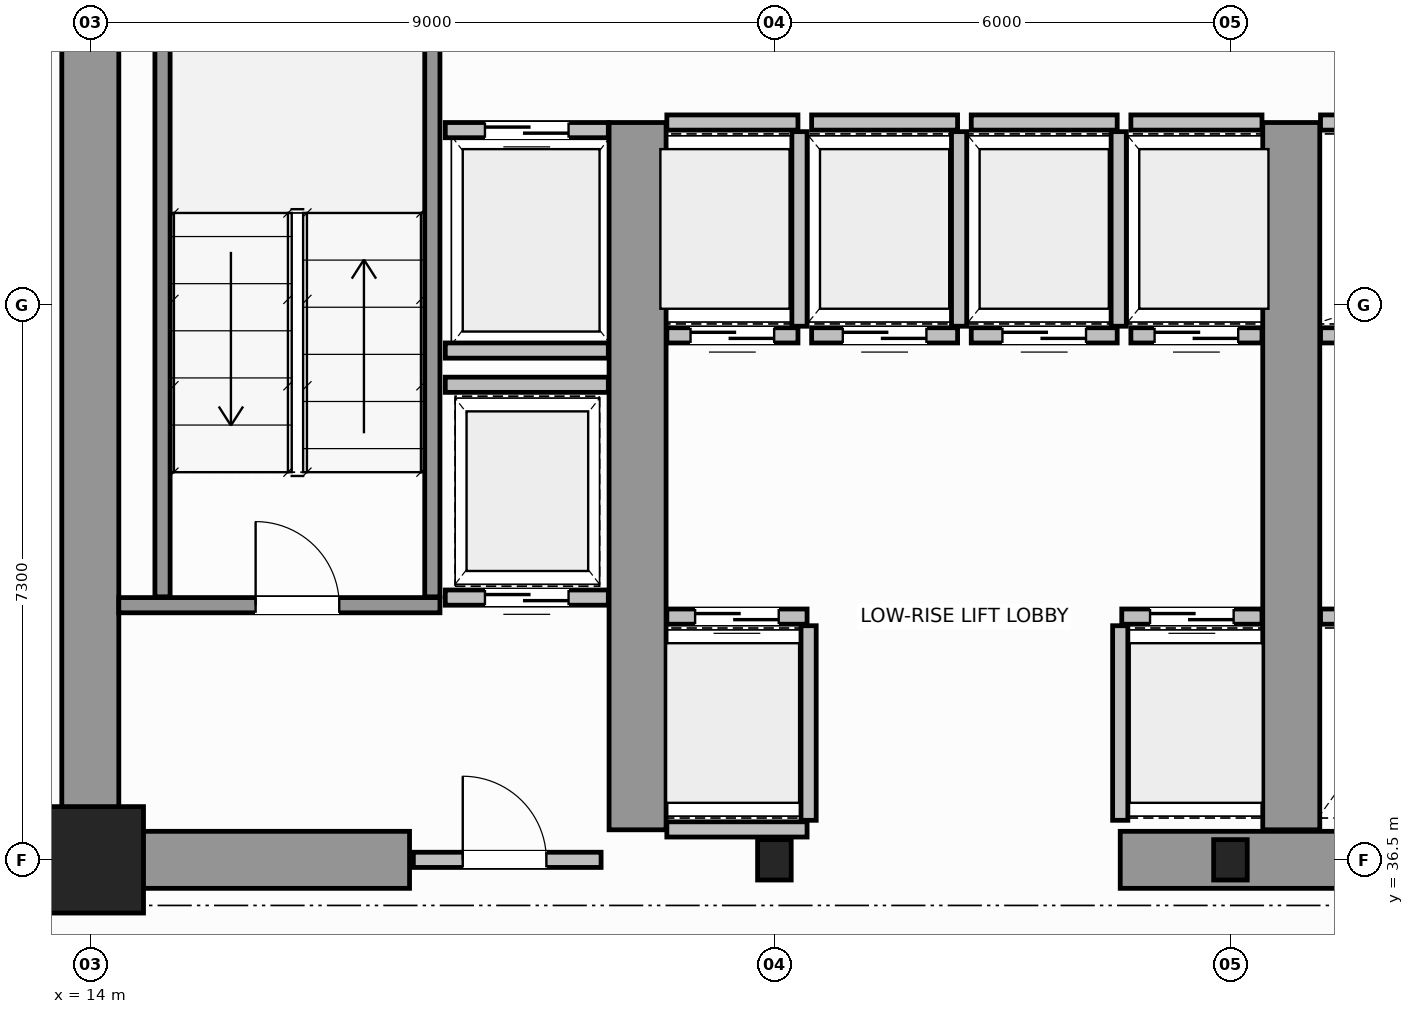
"""IFC4 building model, lengths in metres.
Left out: names, types, materials, properties, quantities, classifications, styles, units other than length and angle.
Written with IfcOpenShell. Run it as: python <this file> out.ifc"""

import sys

from ifc_helpers import new_model, si_unit, direction, frame, frame_2d, origin, origin_2d, place, context, subcontext, project, spatial, rectangle, i_section, extrude, source, transform, mapped, element, fill, save


model = new_model("IFC4")
c1 = context("Model", 3, precision=1e-05, world=origin(), true_north=direction((0.0, 1.0)))
c2 = subcontext(c1, "Body", "Model", "MODEL_VIEW")
j1 = project(units=[si_unit("LENGTHUNIT", "METRE"), si_unit("PLANEANGLEUNIT", "RADIAN")], contexts=[c1])
p1 = place(None, origin())
s1 = spatial("IfcSite", under=j1, at=p1, CompositionType="ELEMENT")
p2 = place(p1, origin())
s2 = spatial("IfcBuilding", under=s1, at=p2, CompositionType="ELEMENT")
p3 = place(p2, frame((0.0, 0.0, 95.8)))
s3 = spatial("IfcBuildingStorey", under=s2, at=p3, CompositionType="ELEMENT", Elevation=95.8)
m1 = source(origin(), c2, "Body", "SweptSolid", [
    extrude(rectangle(XDim=1.4, YDim=1.4, at=origin_2d()), origin(), (0.0, 0.0, 1.0), 3.8),
])
p4 = place(p3, frame((14.0, 36.5, 0.0), z_axis=(0.0, 0.0, 1.0), x_axis=(1.0, 0.0, 0.0)))
e1 = element("IfcColumn", 1, at=p4, inside=s3, PredefinedType="COLUMN", context=c2, shape_type="MappedRepresentation", body=[
    mapped(m1, transform((0.0, 0.0, 0.0), scale=1.0)),
])
m2 = source(origin(), c2, "Body", "SweptSolid", [
    extrude(i_section(OverallWidth=0.442, OverallDepth=0.531, WebThickness=0.065, FlangeThickness=0.076, FilletRadius=0.015, at=origin_2d()), origin(), (0.0, 0.0, 1.0), 3.8),
])
for number, where, z_axis, x_axis in (
    (2, (23.0, 36.5, 0.0), (0.0, 0.0, 1.0), (1.0, 0.0, 0.0)),
    (3, (29.0, 36.5, 0.0), (0.0, 0.0, 1.0), (1.0, 0.0, 0.0)),
):
    element("IfcColumn", number, at=place(p3, frame(where, z_axis=z_axis, x_axis=x_axis)), inside=s3, PredefinedType="COLUMN", context=c2, shape_type="MappedRepresentation", body=[
        mapped(m2, transform((0.0, 0.0, 0.0), scale=1.0)),
    ])
p5 = place(p3, frame((14.0, 36.5, 0.0), z_axis=(0.0, 0.0, 1.0), x_axis=(0.0, 1.0, 0.0)))
e4 = element("IfcWall", 4, at=p5, inside=s3, PredefinedType="SHEAR", context=c2, shape_type="SweptSolid", body=[
    extrude(rectangle(XDim=14.5, YDim=0.75, at=frame_2d((7.25, 0.0))), origin(), (0.0, 0.0, 1.0), 3.8),
])
p6 = place(p3, frame((14.395, 36.5, 0.0), z_axis=(0.0, 0.0, 1.0), x_axis=(1.0, 0.0, 0.0)))
e5 = element("IfcWall", 5, at=p6, inside=s3, PredefinedType="SHEAR", context=c2, shape_type="SweptSolid", body=[
    extrude(rectangle(XDim=3.805, YDim=0.75, at=frame_2d((1.902, 0.0))), origin(), (0.0, 0.0, 1.0), 2.38),
])
p7 = place(p3, frame((27.55, 36.5, 0.0), z_axis=(0.0, 0.0, 1.0), x_axis=(1.0, 0.0, 0.0)))
e6 = element("IfcWall", 6, at=p7, inside=s3, PredefinedType="SHEAR", context=c2, shape_type="SweptSolid", body=[
    extrude(rectangle(XDim=4.5, YDim=0.75, at=frame_2d((2.25, 0.0))), origin(), (0.0, 0.0, 1.0), 3.8),
])
for number, where, z_axis, x_axis in (
    (7, (21.2, 36.895, 0.0), (0.0, 0.0, 1.0), (0.0, 1.0, 0.0)),
    (8, (29.8, 36.895, 0.0), (0.0, 0.0, 1.0), (0.0, 1.0, 0.0)),
):
    element("IfcWall", number, at=place(p3, frame(where, z_axis=z_axis, x_axis=x_axis)), inside=s3, PredefinedType="SHEAR", context=c2, shape_type="SweptSolid", body=[
        extrude(rectangle(XDim=9.305, YDim=0.75, at=frame_2d((4.652, 0.0))), origin(), (0.0, 0.0, 1.0), 3.8),
    ])
p8 = place(p3, frame((14.375, 39.85, 0.0), z_axis=(0.0, 0.0, 1.0), x_axis=(1.0, 0.0, 0.0)))
e9 = element("IfcWall", 9, at=p8, inside=s3, PredefinedType="SOLIDWALL", context=c2, shape_type="SweptSolid", body=[
    extrude(rectangle(XDim=4.225, YDim=0.2, at=frame_2d((2.113, 0.0))), origin(), (0.0, 0.0, 1.0), 3.8),
])
p9 = place(p8, frame((1.8, 0.0, 0.0)))
e10 = element("IfcOpeningElement", 10, at=p9, cuts=e9, PredefinedType="OPENING", context=c2, shape_type="SweptSolid", body=[
    extrude(rectangle(XDim=1.1, YDim=2.15, at=frame_2d((0.55, 1.075))), frame((0.0, 0.11, 0.0), z_axis=(0.0, -1.0, 0.0), x_axis=(1.0, 0.0, 0.0)), (0.0, 0.0, 1.0), 0.22),
])
for number, where, z_axis, x_axis in (
    (11, (14.95, 39.96, 0.0), (0.0, 0.0, 1.0), (0.0, 1.0, 0.0)),
    (12, (18.5, 39.96, 0.0), (0.0, 0.0, 1.0), (0.0, 1.0, 0.0)),
):
    element("IfcWall", number, at=place(p3, frame(where, z_axis=z_axis, x_axis=x_axis)), inside=s3, PredefinedType="SOLIDWALL", context=c2, shape_type="SweptSolid", body=[
        extrude(rectangle(XDim=9.93, YDim=0.2, at=frame_2d((4.965, 0.0))), origin(), (0.0, 0.0, 1.0), 3.8),
    ])
p10 = place(p3, frame((18.25, 36.5, 0.0), z_axis=(0.0, 0.0, 1.0), x_axis=(1.0, 0.0, 0.0)))
e13 = element("IfcWall", 13, at=p10, inside=s3, PredefinedType="SOLIDWALL", context=c2, shape_type="SweptSolid", body=[
    extrude(rectangle(XDim=2.47, YDim=0.2, at=frame_2d((1.235, 0.0))), origin(), (0.0, 0.0, 1.0), 2.37),
])
p11 = place(p10, frame((0.65, 0.0, 0.0)))
e14 = element("IfcOpeningElement", 14, at=p11, cuts=e13, PredefinedType="OPENING", context=c2, shape_type="SweptSolid", body=[
    extrude(rectangle(XDim=1.1, YDim=2.15, at=frame_2d((0.55, 1.075))), frame((0.0, 0.11, 0.0), z_axis=(0.0, -1.0, 0.0), x_axis=(1.0, 0.0, 0.0)), (0.0, 0.0, 1.0), 0.22),
])
p12 = place(p3, frame((21.585, 39.7, 0.0), z_axis=(0.0, 0.0, 1.0), x_axis=(1.0, 0.0, 0.0)))
e15 = element("IfcWall", 15, at=p12, inside=s3, PredefinedType="SOLIDWALL", context=c2, shape_type="SweptSolid", body=[
    extrude(rectangle(XDim=1.845, YDim=0.2, at=frame_2d((0.922, 0.0))), origin(), (0.0, 0.0, 1.0), 3.58),
])
p13 = place(p12, frame((0.372, 0.0, 0.0)))
e16 = element("IfcOpeningElement", 16, at=p13, cuts=e15, PredefinedType="OPENING", context=c2, shape_type="SweptSolid", body=[
    extrude(rectangle(XDim=1.1, YDim=2.15, at=frame_2d((0.55, 1.075))), frame((0.0, 0.11, 0.0), z_axis=(0.0, -1.0, 0.0), x_axis=(1.0, 0.0, 0.0)), (0.0, 0.0, 1.0), 0.22),
])
p14 = place(p3, frame((21.585, 36.9, 0.0), z_axis=(0.0, 0.0, 1.0), x_axis=(1.0, 0.0, 0.0)))
e17 = element("IfcWall", 17, at=p14, inside=s3, PredefinedType="SOLIDWALL", context=c2, shape_type="SweptSolid", body=[
    extrude(rectangle(XDim=1.845, YDim=0.2, at=frame_2d((0.922, 0.0))), origin(), (0.0, 0.0, 1.0), 2.37),
])
p15 = place(p3, frame((23.45, 37.02, 0.0), z_axis=(0.0, 0.0, 1.0), x_axis=(0.0, 1.0, 0.0)))
e18 = element("IfcWall", 18, at=p15, inside=s3, PredefinedType="SOLIDWALL", context=c2, shape_type="SweptSolid", body=[
    extrude(rectangle(XDim=2.56, YDim=0.2, at=frame_2d((1.28, 0.0))), origin(), (0.0, 0.0, 1.0), 3.58),
])
p16 = place(p3, frame((27.57, 39.7, 0.0), z_axis=(0.0, 0.0, 1.0), x_axis=(1.0, 0.0, 0.0)))
e19 = element("IfcWall", 19, at=p16, inside=s3, PredefinedType="SOLIDWALL", context=c2, shape_type="SweptSolid", body=[
    extrude(rectangle(XDim=1.845, YDim=0.2, at=frame_2d((0.922, 0.0))), origin(), (0.0, 0.0, 1.0), 3.58),
])
p17 = place(p16, frame((0.372, 0.0, 0.0)))
e20 = element("IfcOpeningElement", 20, at=p17, cuts=e19, PredefinedType="OPENING", context=c2, shape_type="SweptSolid", body=[
    extrude(rectangle(XDim=1.1, YDim=2.15, at=frame_2d((0.55, 1.075))), frame((0.0, 0.11, 0.0), z_axis=(0.0, -1.0, 0.0), x_axis=(1.0, 0.0, 0.0)), (0.0, 0.0, 1.0), 0.22),
])
p18 = place(p3, frame((27.55, 37.02, 0.0), z_axis=(0.0, 0.0, 1.0), x_axis=(0.0, 1.0, 0.0)))
e21 = element("IfcWall", 21, at=p18, inside=s3, PredefinedType="SOLIDWALL", context=c2, shape_type="SweptSolid", body=[
    extrude(rectangle(XDim=2.56, YDim=0.2, at=frame_2d((1.28, 0.0))), origin(), (0.0, 0.0, 1.0), 3.58),
])
p19 = place(p3, frame((21.585, 43.4, 0.0), z_axis=(0.0, 0.0, 1.0), x_axis=(1.0, 0.0, 0.0)))
e22 = element("IfcWall", 22, at=p19, inside=s3, PredefinedType="SOLIDWALL", context=c2, shape_type="SweptSolid", body=[
    extrude(rectangle(XDim=1.725, YDim=0.2, at=frame_2d((0.863, 0.0))), origin(), (0.0, 0.0, 1.0), 3.58),
])
p20 = place(p19, frame((0.312, 0.0, 0.0)))
e23 = element("IfcOpeningElement", 23, at=p20, cuts=e22, PredefinedType="OPENING", context=c2, shape_type="SweptSolid", body=[
    extrude(rectangle(XDim=1.1, YDim=2.15, at=frame_2d((0.55, 1.075))), frame((0.0, 0.11, 0.0), z_axis=(0.0, -1.0, 0.0), x_axis=(1.0, 0.0, 0.0)), (0.0, 0.0, 1.0), 0.22),
])
p21 = place(p3, frame((21.585, 46.2, 0.0), z_axis=(0.0, 0.0, 1.0), x_axis=(1.0, 0.0, 0.0)))
e24 = element("IfcWall", 24, at=p21, inside=s3, PredefinedType="SOLIDWALL", context=c2, shape_type="SweptSolid", body=[
    extrude(rectangle(XDim=1.725, YDim=0.2, at=frame_2d((0.863, 0.0))), origin(), (0.0, 0.0, 1.0), 3.58),
])
p22 = place(p3, frame((23.33, 43.52, 0.0), z_axis=(0.0, 0.0, 1.0), x_axis=(0.0, 1.0, 0.0)))
e25 = element("IfcWall", 25, at=p22, inside=s3, PredefinedType="SOLIDWALL", context=c2, shape_type="SweptSolid", body=[
    extrude(rectangle(XDim=2.56, YDim=0.2, at=frame_2d((1.28, 0.0))), origin(), (0.0, 0.0, 1.0), 3.58),
])
p23 = place(p3, frame((23.49, 43.4, 0.0), z_axis=(0.0, 0.0, 1.0), x_axis=(1.0, 0.0, 0.0)))
e26 = element("IfcWall", 26, at=p23, inside=s3, PredefinedType="SOLIDWALL", context=c2, shape_type="SweptSolid", body=[
    extrude(rectangle(XDim=1.92, YDim=0.2, at=frame_2d((0.96, 0.0))), origin(), (0.0, 0.0, 1.0), 3.58),
])
p24 = place(p23, frame((0.41, 0.0, 0.0)))
e27 = element("IfcOpeningElement", 27, at=p24, cuts=e26, PredefinedType="OPENING", context=c2, shape_type="SweptSolid", body=[
    extrude(rectangle(XDim=1.1, YDim=2.15, at=frame_2d((0.55, 1.075))), frame((0.0, 0.11, 0.0), z_axis=(0.0, -1.0, 0.0), x_axis=(1.0, 0.0, 0.0)), (0.0, 0.0, 1.0), 0.22),
])
p25 = place(p3, frame((23.49, 46.2, 0.0), z_axis=(0.0, 0.0, 1.0), x_axis=(1.0, 0.0, 0.0)))
e28 = element("IfcWall", 28, at=p25, inside=s3, PredefinedType="SOLIDWALL", context=c2, shape_type="SweptSolid", body=[
    extrude(rectangle(XDim=1.92, YDim=0.2, at=frame_2d((0.96, 0.0))), origin(), (0.0, 0.0, 1.0), 3.58),
])
p26 = place(p3, frame((25.43, 43.52, 0.0), z_axis=(0.0, 0.0, 1.0), x_axis=(0.0, 1.0, 0.0)))
e29 = element("IfcWall", 29, at=p26, inside=s3, PredefinedType="SOLIDWALL", context=c2, shape_type="SweptSolid", body=[
    extrude(rectangle(XDim=2.56, YDim=0.2, at=frame_2d((1.28, 0.0))), origin(), (0.0, 0.0, 1.0), 3.58),
])
p27 = place(p3, frame((25.59, 43.4, 0.0), z_axis=(0.0, 0.0, 1.0), x_axis=(1.0, 0.0, 0.0)))
e30 = element("IfcWall", 30, at=p27, inside=s3, PredefinedType="SOLIDWALL", context=c2, shape_type="SweptSolid", body=[
    extrude(rectangle(XDim=1.92, YDim=0.2, at=frame_2d((0.96, 0.0))), origin(), (0.0, 0.0, 1.0), 3.58),
])
p28 = place(p27, frame((0.41, 0.0, 0.0)))
e31 = element("IfcOpeningElement", 31, at=p28, cuts=e30, PredefinedType="OPENING", context=c2, shape_type="SweptSolid", body=[
    extrude(rectangle(XDim=1.1, YDim=2.15, at=frame_2d((0.55, 1.075))), frame((0.0, 0.11, 0.0), z_axis=(0.0, -1.0, 0.0), x_axis=(1.0, 0.0, 0.0)), (0.0, 0.0, 1.0), 0.22),
])
p29 = place(p3, frame((25.59, 46.2, 0.0), z_axis=(0.0, 0.0, 1.0), x_axis=(1.0, 0.0, 0.0)))
e32 = element("IfcWall", 32, at=p29, inside=s3, PredefinedType="SOLIDWALL", context=c2, shape_type="SweptSolid", body=[
    extrude(rectangle(XDim=1.92, YDim=0.2, at=frame_2d((0.96, 0.0))), origin(), (0.0, 0.0, 1.0), 3.58),
])
p30 = place(p3, frame((27.53, 43.52, 0.0), z_axis=(0.0, 0.0, 1.0), x_axis=(0.0, 1.0, 0.0)))
e33 = element("IfcWall", 33, at=p30, inside=s3, PredefinedType="SOLIDWALL", context=c2, shape_type="SweptSolid", body=[
    extrude(rectangle(XDim=2.56, YDim=0.2, at=frame_2d((1.28, 0.0))), origin(), (0.0, 0.0, 1.0), 3.58),
])
p31 = place(p3, frame((27.69, 43.4, 0.0), z_axis=(0.0, 0.0, 1.0), x_axis=(1.0, 0.0, 0.0)))
e34 = element("IfcWall", 34, at=p31, inside=s3, PredefinedType="SOLIDWALL", context=c2, shape_type="SweptSolid", body=[
    extrude(rectangle(XDim=1.725, YDim=0.2, at=frame_2d((0.863, 0.0))), origin(), (0.0, 0.0, 1.0), 3.58),
])
p32 = place(p31, frame((0.312, 0.0, 0.0)))
e35 = element("IfcOpeningElement", 35, at=p32, cuts=e34, PredefinedType="OPENING", context=c2, shape_type="SweptSolid", body=[
    extrude(rectangle(XDim=1.1, YDim=2.15, at=frame_2d((0.55, 1.075))), frame((0.0, 0.11, 0.0), z_axis=(0.0, -1.0, 0.0), x_axis=(1.0, 0.0, 0.0)), (0.0, 0.0, 1.0), 0.22),
])
p33 = place(p3, frame((27.69, 46.2, 0.0), z_axis=(0.0, 0.0, 1.0), x_axis=(1.0, 0.0, 0.0)))
e36 = element("IfcWall", 36, at=p33, inside=s3, PredefinedType="SOLIDWALL", context=c2, shape_type="SweptSolid", body=[
    extrude(rectangle(XDim=1.725, YDim=0.2, at=frame_2d((0.863, 0.0))), origin(), (0.0, 0.0, 1.0), 3.58),
])
p34 = place(p3, frame((30.185, 39.7, 0.0), z_axis=(0.0, 0.0, 1.0), x_axis=(1.0, 0.0, 0.0)))
e37 = element("IfcWall", 37, at=p34, inside=s3, PredefinedType="SOLIDWALL", context=c2, shape_type="SweptSolid", body=[
    extrude(rectangle(XDim=1.845, YDim=0.2, at=frame_2d((0.922, 0.0))), origin(), (0.0, 0.0, 1.0), 3.58),
])
for number, where, z_axis, x_axis in (
    (38, (30.185, 43.4, 0.0), (0.0, 0.0, 1.0), (1.0, 0.0, 0.0)),
    (39, (30.185, 46.2, 0.0), (0.0, 0.0, 1.0), (1.0, 0.0, 0.0)),
):
    element("IfcWall", number, at=place(p3, frame(where, z_axis=z_axis, x_axis=x_axis)), inside=s3, PredefinedType="SOLIDWALL", context=c2, shape_type="SweptSolid", body=[
        extrude(rectangle(XDim=1.725, YDim=0.2, at=frame_2d((0.862, 0.0))), origin(), (0.0, 0.0, 1.0), 3.58),
    ])
p35 = place(p3, frame((18.67, 46.1, 0.0), z_axis=(0.0, 0.0, 1.0), x_axis=(1.0, 0.0, 0.0)))
e40 = element("IfcWall", 40, at=p35, inside=s3, PredefinedType="SOLIDWALL", context=c2, shape_type="SweptSolid", body=[
    extrude(rectangle(XDim=2.145, YDim=0.2, at=frame_2d((1.073, 0.0))), origin(), (0.0, 0.0, 1.0), 3.58),
])
p36 = place(p35, frame((0.522, 0.0, 0.0)))
e41 = element("IfcOpeningElement", 41, at=p36, cuts=e40, PredefinedType="OPENING", context=c2, shape_type="SweptSolid", body=[
    extrude(rectangle(XDim=1.1, YDim=2.15, at=frame_2d((0.55, 1.075))), frame((0.0, 0.11, 0.0), z_axis=(0.0, -1.0, 0.0), x_axis=(1.0, 0.0, 0.0)), (0.0, 0.0, 1.0), 0.22),
])
p37 = place(p3, frame((18.67, 43.2, 0.0), z_axis=(0.0, 0.0, 1.0), x_axis=(1.0, 0.0, 0.0)))
e42 = element("IfcWall", 42, at=p37, inside=s3, PredefinedType="SOLIDWALL", context=c2, shape_type="SweptSolid", body=[
    extrude(rectangle(XDim=2.145, YDim=0.2, at=frame_2d((1.073, 0.0))), origin(), (0.0, 0.0, 1.0), 3.58),
])
p38 = place(p3, frame((18.67, 39.95, 0.0), z_axis=(0.0, 0.0, 1.0), x_axis=(1.0, 0.0, 0.0)))
e43 = element("IfcWall", 43, at=p38, inside=s3, PredefinedType="SOLIDWALL", context=c2, shape_type="SweptSolid", body=[
    extrude(rectangle(XDim=2.145, YDim=0.2, at=frame_2d((1.073, 0.0))), origin(), (0.0, 0.0, 1.0), 3.58),
])
p39 = place(p38, frame((0.522, 0.0, 0.0)))
e44 = element("IfcOpeningElement", 44, at=p39, cuts=e43, PredefinedType="OPENING", context=c2, shape_type="SweptSolid", body=[
    extrude(rectangle(XDim=1.1, YDim=2.15, at=frame_2d((0.55, 1.075))), frame((0.0, 0.11, 0.0), z_axis=(0.0, -1.0, 0.0), x_axis=(1.0, 0.0, 0.0)), (0.0, 0.0, 1.0), 0.22),
])
p40 = place(p3, frame((18.67, 42.75, 0.0), z_axis=(0.0, 0.0, 1.0), x_axis=(1.0, 0.0, 0.0)))
e45 = element("IfcWall", 45, at=p40, inside=s3, PredefinedType="SOLIDWALL", context=c2, shape_type="SweptSolid", body=[
    extrude(rectangle(XDim=2.145, YDim=0.2, at=frame_2d((1.073, 0.0))), origin(), (0.0, 0.0, 1.0), 3.58),
])
p41 = place(p3, frame((7.276, 36.48, 0.0), z_axis=(0.0, 0.0, 1.0), x_axis=(1.0, 0.0, 0.0)))
e46 = element("IfcWall", 46, at=p41, inside=s3, PredefinedType="PARTITIONING", context=c2, shape_type="SweptSolid", body=[
    extrude(rectangle(XDim=6.664, YDim=0.12, at=frame_2d((3.332, 0.0))), origin(), (0.0, 0.0, 1.0), 2.87),
])
p42 = place(p41, frame((2.882, 0.0, 0.0)))
e47 = element("IfcOpeningElement", 47, at=p42, cuts=e46, PredefinedType="OPENING", context=c2, shape_type="SweptSolid", body=[
    extrude(rectangle(XDim=0.9, YDim=2.15, at=frame_2d((0.45, 1.075))), frame((0.0, 0.07, 0.0), z_axis=(0.0, -1.0, 0.0), x_axis=(1.0, 0.0, 0.0)), (0.0, 0.0, 1.0), 0.14),
])
m3 = source(origin(), c2, "Body", "SweptSolid", [
    extrude(rectangle(XDim=1.1, YDim=2.15, at=frame_2d((0.55, 1.075))), frame((0.0, 0.025, 0.0), z_axis=(0.0, -1.0, 0.0), x_axis=(1.0, 0.0, 0.0)), (0.0, 0.0, 1.0), 0.05),
])
p43 = place(p9, origin())
e48 = element("IfcDoor", 48, at=p43, inside=s3, OperationType="SINGLE_SWING_LEFT", PredefinedType="DOOR", context=c2, shape_type="MappedRepresentation", body=[
    mapped(m3, transform((0.0, 0.0, 0.0), scale=1.0)),
])
fill(e10, e48)
p44 = place(p11, origin())
e49 = element("IfcDoor", 49, at=p44, inside=s3, OperationType="SINGLE_SWING_RIGHT", PredefinedType="DOOR", context=c2, shape_type="MappedRepresentation", body=[
    mapped(m3, transform((0.0, 0.0, 0.0), scale=1.0)),
])
fill(e14, e49)
p45 = place(p13, origin())
e50 = element("IfcDoor", 50, at=p45, inside=s3, OperationType="DOUBLE_DOOR_SLIDING", PredefinedType="DOOR", context=c2, shape_type="MappedRepresentation", body=[
    mapped(m3, transform((0.0, 0.0, 0.0), scale=1.0)),
])
fill(e16, e50)
p46 = place(p17, origin())
e51 = element("IfcDoor", 51, at=p46, inside=s3, OperationType="DOUBLE_DOOR_SLIDING", PredefinedType="DOOR", context=c2, shape_type="MappedRepresentation", body=[
    mapped(m3, transform((0.0, 0.0, 0.0), scale=1.0)),
])
fill(e20, e51)
p47 = place(p20, origin())
e52 = element("IfcDoor", 52, at=p47, inside=s3, OperationType="DOUBLE_DOOR_SLIDING", PredefinedType="DOOR", context=c2, shape_type="MappedRepresentation", body=[
    mapped(m3, transform((0.0, 0.0, 0.0), scale=1.0)),
])
fill(e23, e52)
p48 = place(p24, origin())
e53 = element("IfcDoor", 53, at=p48, inside=s3, OperationType="DOUBLE_DOOR_SLIDING", PredefinedType="DOOR", context=c2, shape_type="MappedRepresentation", body=[
    mapped(m3, transform((0.0, 0.0, 0.0), scale=1.0)),
])
fill(e27, e53)
p49 = place(p28, origin())
e54 = element("IfcDoor", 54, at=p49, inside=s3, OperationType="DOUBLE_DOOR_SLIDING", PredefinedType="DOOR", context=c2, shape_type="MappedRepresentation", body=[
    mapped(m3, transform((0.0, 0.0, 0.0), scale=1.0)),
])
fill(e31, e54)
p50 = place(p32, origin())
e55 = element("IfcDoor", 55, at=p50, inside=s3, OperationType="DOUBLE_DOOR_SLIDING", PredefinedType="DOOR", context=c2, shape_type="MappedRepresentation", body=[
    mapped(m3, transform((0.0, 0.0, 0.0), scale=1.0)),
])
fill(e35, e55)
p51 = place(p36, origin())
e56 = element("IfcDoor", 56, at=p51, inside=s3, OperationType="DOUBLE_DOOR_SLIDING", PredefinedType="DOOR", context=c2, shape_type="MappedRepresentation", body=[
    mapped(m3, transform((0.0, 0.0, 0.0), scale=1.0)),
])
fill(e41, e56)
p52 = place(p39, origin())
e57 = element("IfcDoor", 57, at=p52, inside=s3, OperationType="DOUBLE_DOOR_SLIDING", PredefinedType="DOOR", context=c2, shape_type="MappedRepresentation", body=[
    mapped(m3, transform((0.0, 0.0, 0.0), scale=1.0)),
])
fill(e44, e57)
save(model, sys.argv[1])
